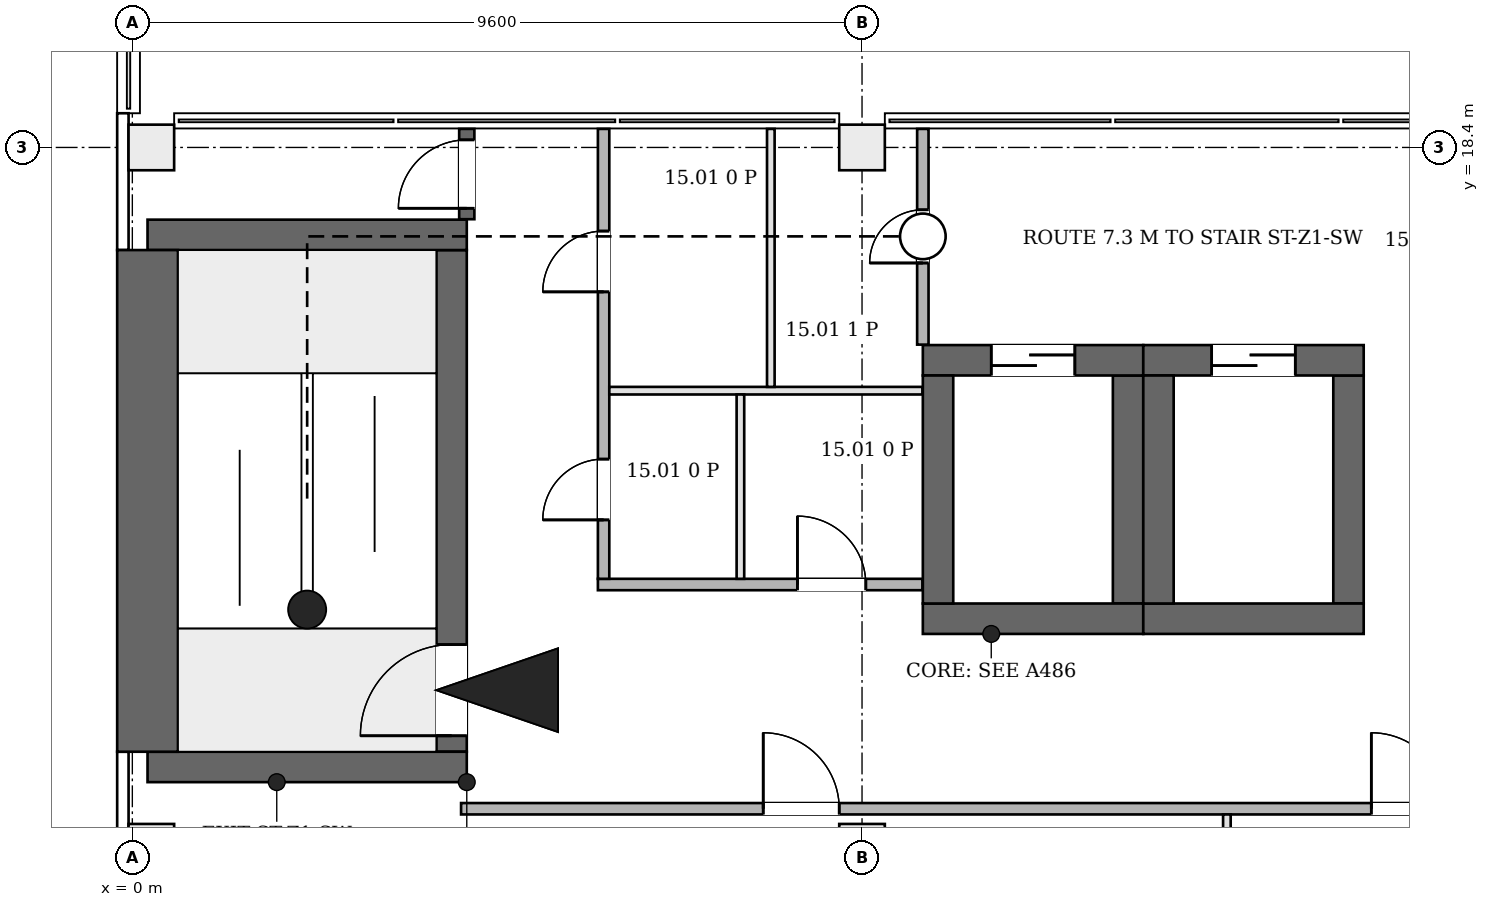
"""IFC4 building model, lengths in metres.
Left out: names, types, materials, properties, quantities, classifications, styles, units other than length and angle.
Written with IfcOpenShell. Run it as: python <this file> out.ifc"""

import sys

from ifc_helpers import new_model, si_unit, direction, frame, frame_2d, origin, origin_2d, place, context, subcontext, project, spatial, rectangle, extrude, element, fill, save


model = new_model("IFC4")
c1 = context("Model", 3, precision=1e-05, world=origin(), true_north=direction((0.0, 1.0)))
c2 = subcontext(c1, "Body", "Model", "MODEL_VIEW")
j1 = project(units=[si_unit("LENGTHUNIT", "METRE"), si_unit("PLANEANGLEUNIT", "RADIAN")], contexts=[c1])
p1 = place(None, origin())
s1 = spatial("IfcSite", under=j1, at=p1, CompositionType="ELEMENT")
p2 = place(p1, origin())
s2 = spatial("IfcBuilding", under=s1, at=p2, CompositionType="ELEMENT")
p3 = place(p2, frame((0.0, 0.0, 73.9)))
s3 = spatial("IfcBuildingStorey", under=s2, at=p3, CompositionType="ELEMENT", Elevation=73.9)
for number, where, z_axis, x_axis in (
    (1, (0.2, 10.25, 0.0), (0.0, 0.0, 1.0), (1.0, 0.0, 0.0)),
    (2, (0.2, 17.25, 0.0), (0.0, 0.0, 1.0), (1.0, 0.0, 0.0)),
):
    element("IfcWall", number, at=place(p3, frame(where, z_axis=z_axis, x_axis=x_axis)), inside=s3, PredefinedType="SHEAR", context=c2, shape_type="SweptSolid", body=[
        extrude(rectangle(XDim=4.2, YDim=0.4, at=frame_2d((2.1, 0.0))), origin(), (0.0, 0.0, 1.0), 4.2),
    ])
p4 = place(p3, frame((0.2, 10.45, 0.0), z_axis=(0.0, 0.0, 1.0), x_axis=(0.0, 1.0, 0.0)))
e3 = element("IfcWall", 3, at=p4, inside=s3, PredefinedType="SHEAR", context=c2, shape_type="SweptSolid", body=[
    extrude(rectangle(XDim=6.6, YDim=0.8, at=frame_2d((3.3, 0.0))), origin(), (0.0, 0.0, 1.0), 4.2),
])
p5 = place(p3, frame((4.2, 10.45, 0.0), z_axis=(0.0, 0.0, 1.0), x_axis=(0.0, 1.0, 0.0)))
e4 = element("IfcWall", 4, at=p5, inside=s3, PredefinedType="SHEAR", context=c2, shape_type="SweptSolid", body=[
    extrude(rectangle(XDim=6.6, YDim=0.4, at=frame_2d((3.3, 0.0))), origin(), (0.0, 0.0, 1.0), 4.2),
])
p6 = place(p5, frame((0.21, 0.0, 0.0)))
e5 = element("IfcOpeningElement", 5, at=p6, cuts=e4, PredefinedType="OPENING", context=c2, shape_type="SweptSolid", body=[
    extrude(rectangle(XDim=1.2, YDim=2.1, at=frame_2d((0.6, 1.05))), frame((0.0, 0.21, 0.0), z_axis=(0.0, -1.0, 0.0), x_axis=(1.0, 0.0, 0.0)), (0.0, 0.0, 1.0), 0.42),
])
p7 = place(p3, frame((10.4, 12.2, 0.0), z_axis=(0.0, 0.0, 1.0), x_axis=(1.0, 0.0, 0.0)))
e6 = element("IfcWall", 6, at=p7, inside=s3, PredefinedType="SHEAR", context=c2, shape_type="SweptSolid", body=[
    extrude(rectangle(XDim=2.9, YDim=0.4, at=frame_2d((1.45, 0.0))), origin(), (0.0, 0.0, 1.0), 4.2),
])
p8 = place(p3, frame((10.4, 15.6, 0.0), z_axis=(0.0, 0.0, 1.0), x_axis=(1.0, 0.0, 0.0)))
e7 = element("IfcWall", 7, at=p8, inside=s3, PredefinedType="SHEAR", context=c2, shape_type="SweptSolid", body=[
    extrude(rectangle(XDim=2.9, YDim=0.4, at=frame_2d((1.45, 0.0))), origin(), (0.0, 0.0, 1.0), 4.2),
])
p9 = place(p8, frame((0.9, 0.0, 0.0)))
e8 = element("IfcOpeningElement", 8, at=p9, cuts=e7, PredefinedType="OPENING", context=c2, shape_type="SweptSolid", body=[
    extrude(rectangle(XDim=1.1, YDim=2.1, at=frame_2d((0.55, 1.05))), frame((0.0, 0.21, 0.0), z_axis=(0.0, -1.0, 0.0), x_axis=(1.0, 0.0, 0.0)), (0.0, 0.0, 1.0), 0.42),
])
for number, where, z_axis, x_axis in (
    (9, (10.6, 12.4, 0.0), (0.0, 0.0, 1.0), (0.0, 1.0, 0.0)),
    (10, (13.1, 12.4, 0.0), (0.0, 0.0, 1.0), (0.0, 1.0, 0.0)),
):
    element("IfcWall", number, at=place(p3, frame(where, z_axis=z_axis, x_axis=x_axis)), inside=s3, PredefinedType="SHEAR", context=c2, shape_type="SweptSolid", body=[
        extrude(rectangle(XDim=3.0, YDim=0.4, at=frame_2d((1.5, 0.0))), origin(), (0.0, 0.0, 1.0), 4.2),
    ])
p10 = place(p3, frame((13.3, 12.2, 0.0), z_axis=(0.0, 0.0, 1.0), x_axis=(1.0, 0.0, 0.0)))
e11 = element("IfcWall", 11, at=p10, inside=s3, PredefinedType="SHEAR", context=c2, shape_type="SweptSolid", body=[
    extrude(rectangle(XDim=2.9, YDim=0.4, at=frame_2d((1.45, 0.0))), origin(), (0.0, 0.0, 1.0), 4.2),
])
p11 = place(p3, frame((13.3, 15.6, 0.0), z_axis=(0.0, 0.0, 1.0), x_axis=(1.0, 0.0, 0.0)))
e12 = element("IfcWall", 12, at=p11, inside=s3, PredefinedType="SHEAR", context=c2, shape_type="SweptSolid", body=[
    extrude(rectangle(XDim=2.9, YDim=0.4, at=frame_2d((1.45, 0.0))), origin(), (0.0, 0.0, 1.0), 4.2),
])
p12 = place(p11, frame((0.9, 0.0, 0.0)))
e13 = element("IfcOpeningElement", 13, at=p12, cuts=e12, PredefinedType="OPENING", context=c2, shape_type="SweptSolid", body=[
    extrude(rectangle(XDim=1.1, YDim=2.1, at=frame_2d((0.55, 1.05))), frame((0.0, 0.21, 0.0), z_axis=(0.0, -1.0, 0.0), x_axis=(1.0, 0.0, 0.0)), (0.0, 0.0, 1.0), 0.42),
])
for number, where, z_axis, x_axis in (
    (14, (13.5, 12.4, 0.0), (0.0, 0.0, 1.0), (0.0, 1.0, 0.0)),
    (15, (16.0, 12.4, 0.0), (0.0, 0.0, 1.0), (0.0, 1.0, 0.0)),
):
    element("IfcWall", number, at=place(p3, frame(where, z_axis=z_axis, x_axis=x_axis)), inside=s3, PredefinedType="SHEAR", context=c2, shape_type="SweptSolid", body=[
        extrude(rectangle(XDim=3.0, YDim=0.4, at=frame_2d((1.5, 0.0))), origin(), (0.0, 0.0, 1.0), 4.2),
    ])
for number, where, z_axis, x_axis in (
    (16, (0.25, 9.2, 0.0), (0.0, 0.0, 1.0), (1.0, 0.0, 0.0)),
    (17, (9.6, 9.2, 0.0), (0.0, 0.0, 1.0), (1.0, 0.0, 0.0)),
    (18, (0.25, 18.4, 0.0), (0.0, 0.0, 1.0), (1.0, 0.0, 0.0)),
    (19, (9.6, 18.4, 0.0), (0.0, 0.0, 1.0), (1.0, 0.0, 0.0)),
):
    element("IfcColumn", number, at=place(p3, frame(where, z_axis=z_axis, x_axis=x_axis)), inside=s3, PredefinedType="COLUMN", context=c2, shape_type="SweptSolid", body=[
        extrude(rectangle(XDim=0.6, YDim=0.6, at=origin_2d()), origin(), (0.0, 0.0, 1.0), 4.2),
    ])
p13 = place(p3, frame((-0.125, 10.45, 0.0), z_axis=(0.0, 0.0, 1.0), x_axis=(0.0, -1.0, 0.0)))
e20 = element("IfcWall", 20, at=p13, inside=s3, PredefinedType="ELEMENTEDWALL", context=c2, shape_type="SweptSolid", body=[
    extrude(rectangle(XDim=10.65, YDim=0.15, at=frame_2d((5.325, 0.0))), origin(), (0.0, 0.0, 1.0), 3.9),
])
p14 = place(p13, frame((8.325, 0.0, 0.9)))
e21 = element("IfcOpeningElement", 21, at=p14, cuts=e20, PredefinedType="OPENING", context=c2, shape_type="SweptSolid", body=[
    extrude(rectangle(XDim=1.2, YDim=2.6, at=frame_2d((0.6, 1.3))), frame((0.0, 0.085, 0.0), z_axis=(0.0, -1.0, 0.0), x_axis=(1.0, 0.0, 0.0)), (0.0, 0.0, 1.0), 0.17),
])
p15 = place(p13, frame((5.925, 0.0, 0.9)))
e22 = element("IfcOpeningElement", 22, at=p15, cuts=e20, PredefinedType="OPENING", context=c2, shape_type="SweptSolid", body=[
    extrude(rectangle(XDim=1.2, YDim=2.6, at=frame_2d((0.6, 1.3))), frame((0.0, 0.085, 0.0), z_axis=(0.0, -1.0, 0.0), x_axis=(1.0, 0.0, 0.0)), (0.0, 0.0, 1.0), 0.17),
])
p16 = place(p13, frame((3.525, 0.0, 0.9)))
e23 = element("IfcOpeningElement", 23, at=p16, cuts=e20, PredefinedType="OPENING", context=c2, shape_type="SweptSolid", body=[
    extrude(rectangle(XDim=1.2, YDim=2.6, at=frame_2d((0.6, 1.3))), frame((0.0, 0.085, 0.0), z_axis=(0.0, -1.0, 0.0), x_axis=(1.0, 0.0, 0.0)), (0.0, 0.0, 1.0), 0.17),
])
p17 = place(p13, frame((1.125, 0.0, 0.9)))
e24 = element("IfcOpeningElement", 24, at=p17, cuts=e20, PredefinedType="OPENING", context=c2, shape_type="SweptSolid", body=[
    extrude(rectangle(XDim=1.2, YDim=2.6, at=frame_2d((0.6, 1.3))), frame((0.0, 0.085, 0.0), z_axis=(0.0, -1.0, 0.0), x_axis=(1.0, 0.0, 0.0)), (0.0, 0.0, 1.0), 0.17),
])
p18 = place(p3, frame((-0.125, 18.85, 0.0), z_axis=(0.0, 0.0, 1.0), x_axis=(0.0, -1.0, 0.0)))
e25 = element("IfcWall", 25, at=p18, inside=s3, PredefinedType="ELEMENTEDWALL", context=c2, shape_type="SweptSolid", body=[
    extrude(rectangle(XDim=1.8, YDim=0.15, at=frame_2d((0.9, 0.0))), origin(), (0.0, 0.0, 1.0), 3.9),
])
p19 = place(p3, frame((4.4, 17.456, 0.0), z_axis=(0.0, 0.0, 1.0), x_axis=(0.0, 1.0, 0.0)))
e26 = element("IfcWall", 26, at=p19, inside=s3, PredefinedType="PARTITIONING", context=c2, shape_type="SweptSolid", body=[
    extrude(rectangle(XDim=1.188, YDim=0.2, at=frame_2d((0.594, 0.0))), origin(), (0.0, 0.0, 1.0), 3.9),
])
p20 = place(p19, frame((0.144, 0.0, 0.0)))
e27 = element("IfcOpeningElement", 27, at=p20, cuts=e26, PredefinedType="OPENING", context=c2, shape_type="SweptSolid", body=[
    extrude(rectangle(XDim=0.9, YDim=2.1, at=frame_2d((0.45, 1.05))), frame((0.0, 0.11, 0.0), z_axis=(0.0, -1.0, 0.0), x_axis=(1.0, 0.0, 0.0)), (0.0, 0.0, 1.0), 0.22),
])
p21 = place(p3, frame((4.325, 9.7, 0.0), z_axis=(0.0, 0.0, 1.0), x_axis=(1.0, 0.0, 0.0)))
e28 = element("IfcWall", 28, at=p21, inside=s3, PredefinedType="PARTITIONING", context=c2, shape_type="SweptSolid", body=[
    extrude(rectangle(XDim=34.369, YDim=0.15, at=frame_2d((17.185, 0.0))), origin(), (0.0, 0.0, 1.0), 3.9),
])
p22 = place(p21, frame((3.975, 0.0, 0.0)))
e29 = element("IfcOpeningElement", 29, at=p22, cuts=e28, PredefinedType="OPENING", context=c2, shape_type="SweptSolid", body=[
    extrude(rectangle(XDim=1.0, YDim=2.1, at=frame_2d((0.5, 1.05))), frame((0.0, 0.085, 0.0), z_axis=(0.0, -1.0, 0.0), x_axis=(1.0, 0.0, 0.0)), (0.0, 0.0, 1.0), 0.17),
])
p23 = place(p21, frame((11.975, 0.0, 0.0)))
e30 = element("IfcOpeningElement", 30, at=p23, cuts=e28, PredefinedType="OPENING", context=c2, shape_type="SweptSolid", body=[
    extrude(rectangle(XDim=1.0, YDim=2.1, at=frame_2d((0.5, 1.05))), frame((0.0, 0.085, 0.0), z_axis=(0.0, -1.0, 0.0), x_axis=(1.0, 0.0, 0.0)), (0.0, 0.0, 1.0), 0.17),
])
p24 = place(p21, frame((19.175, 0.0, 0.0)))
e31 = element("IfcOpeningElement", 31, at=p24, cuts=e28, PredefinedType="OPENING", context=c2, shape_type="SweptSolid", body=[
    extrude(rectangle(XDim=1.0, YDim=2.1, at=frame_2d((0.5, 1.05))), frame((0.0, 0.085, 0.0), z_axis=(0.0, -1.0, 0.0), x_axis=(1.0, 0.0, 0.0)), (0.0, 0.0, 1.0), 0.17),
])
p25 = place(p21, frame((28.925, 0.0, 0.0)))
e32 = element("IfcOpeningElement", 32, at=p25, cuts=e28, PredefinedType="OPENING", context=c2, shape_type="SweptSolid", body=[
    extrude(rectangle(XDim=1.0, YDim=2.1, at=frame_2d((0.5, 1.05))), frame((0.0, 0.085, 0.0), z_axis=(0.0, -1.0, 0.0), x_axis=(1.0, 0.0, 0.0)), (0.0, 0.0, 1.0), 0.17),
])
p26 = place(p3, frame((6.125, 12.65, 0.0), z_axis=(0.0, 0.0, 1.0), x_axis=(1.0, 0.0, 0.0)))
e33 = element("IfcWall", 33, at=p26, inside=s3, PredefinedType="PARTITIONING", context=c2, shape_type="SweptSolid", body=[
    extrude(rectangle(XDim=4.269, YDim=0.15, at=frame_2d((2.135, 0.0))), origin(), (0.0, 0.0, 1.0), 3.9),
])
p27 = place(p26, frame((2.625, 0.0, 0.0)))
e34 = element("IfcOpeningElement", 34, at=p27, cuts=e33, PredefinedType="OPENING", context=c2, shape_type="SweptSolid", body=[
    extrude(rectangle(XDim=0.9, YDim=2.1, at=frame_2d((0.45, 1.05))), frame((0.0, 0.085, 0.0), z_axis=(0.0, -1.0, 0.0), x_axis=(1.0, 0.0, 0.0)), (0.0, 0.0, 1.0), 0.17),
])
p28 = place(p3, frame((6.2, 12.725, 0.0), z_axis=(0.0, 0.0, 1.0), x_axis=(0.0, 1.0, 0.0)))
e35 = element("IfcWall", 35, at=p28, inside=s3, PredefinedType="PARTITIONING", context=c2, shape_type="SweptSolid", body=[
    extrude(rectangle(XDim=5.919, YDim=0.15, at=frame_2d((2.959, 0.0))), origin(), (0.0, 0.0, 1.0), 3.9),
])
p29 = place(p28, frame((0.775, 0.0, 0.0)))
e36 = element("IfcOpeningElement", 36, at=p29, cuts=e35, PredefinedType="OPENING", context=c2, shape_type="SweptSolid", body=[
    extrude(rectangle(XDim=0.8, YDim=2.1, at=frame_2d((0.4, 1.05))), frame((0.0, 0.085, 0.0), z_axis=(0.0, -1.0, 0.0), x_axis=(1.0, 0.0, 0.0)), (0.0, 0.0, 1.0), 0.17),
])
p30 = place(p28, frame((3.775, 0.0, 0.0)))
e37 = element("IfcOpeningElement", 37, at=p30, cuts=e35, PredefinedType="OPENING", context=c2, shape_type="SweptSolid", body=[
    extrude(rectangle(XDim=0.8, YDim=2.1, at=frame_2d((0.4, 1.05))), frame((0.0, 0.085, 0.0), z_axis=(0.0, -1.0, 0.0), x_axis=(1.0, 0.0, 0.0)), (0.0, 0.0, 1.0), 0.17),
])
p31 = place(p3, frame((6.275, 15.2, 0.0), z_axis=(0.0, 0.0, 1.0), x_axis=(1.0, 0.0, 0.0)))
e38 = element("IfcWall", 38, at=p31, inside=s3, PredefinedType="PARTITIONING", context=c2, shape_type="SweptSolid", body=[
    extrude(rectangle(XDim=4.119, YDim=0.1, at=frame_2d((2.06, 0.0))), origin(), (0.0, 0.0, 1.0), 3.9),
])
p32 = place(p3, frame((8.0, 12.725, 0.0), z_axis=(0.0, 0.0, 1.0), x_axis=(0.0, 1.0, 0.0)))
e39 = element("IfcWall", 39, at=p32, inside=s3, PredefinedType="PARTITIONING", context=c2, shape_type="SweptSolid", body=[
    extrude(rectangle(XDim=2.425, YDim=0.1, at=frame_2d((1.212, 0.0))), origin(), (0.0, 0.0, 1.0), 3.9),
])
p33 = place(p3, frame((8.4, 15.25, 0.0), z_axis=(0.0, 0.0, 1.0), x_axis=(0.0, 1.0, 0.0)))
e40 = element("IfcWall", 40, at=p33, inside=s3, PredefinedType="PARTITIONING", context=c2, shape_type="SweptSolid", body=[
    extrude(rectangle(XDim=3.394, YDim=0.1, at=frame_2d((1.697, 0.0))), origin(), (0.0, 0.0, 1.0), 3.9),
])
p34 = place(p3, frame((10.4, 15.806, 0.0), z_axis=(0.0, 0.0, 1.0), x_axis=(0.0, 1.0, 0.0)))
e41 = element("IfcWall", 41, at=p34, inside=s3, PredefinedType="PARTITIONING", context=c2, shape_type="SweptSolid", body=[
    extrude(rectangle(XDim=2.838, YDim=0.15, at=frame_2d((1.419, 0.0))), origin(), (0.0, 0.0, 1.0), 3.9),
])
p35 = place(p34, frame((1.074, 0.0, 0.0)))
e42 = element("IfcOpeningElement", 42, at=p35, cuts=e41, PredefinedType="OPENING", context=c2, shape_type="SweptSolid", body=[
    extrude(rectangle(XDim=0.7, YDim=2.1, at=frame_2d((0.35, 1.05))), frame((0.0, 0.085, 0.0), z_axis=(0.0, -1.0, 0.0), x_axis=(1.0, 0.0, 0.0)), (0.0, 0.0, 1.0), 0.17),
])
p36 = place(p3, frame((14.4, 0.006, 0.0), z_axis=(0.0, 0.0, 1.0), x_axis=(0.0, 1.0, 0.0)))
e43 = element("IfcWall", 43, at=p36, inside=s3, PredefinedType="PARTITIONING", context=c2, shape_type="SweptSolid", body=[
    extrude(rectangle(XDim=9.619, YDim=0.1, at=frame_2d((4.81, 0.0))), origin(), (0.0, 0.0, 1.0), 3.9),
])
p37 = place(p6, origin())
e44 = element("IfcDoor", 44, at=p37, inside=s3, OperationType="SINGLE_SWING_RIGHT", PredefinedType="DOOR", context=c2, shape_type="SweptSolid", body=[
    extrude(rectangle(XDim=1.2, YDim=2.1, at=frame_2d((0.6, 1.05))), frame((0.0, 0.025, 0.0), z_axis=(0.0, -1.0, 0.0), x_axis=(1.0, 0.0, 0.0)), (0.0, 0.0, 1.0), 0.05),
])
fill(e5, e44)
p38 = place(p9, origin())
e45 = element("IfcDoor", 45, at=p38, inside=s3, OperationType="DOUBLE_DOOR_SLIDING", PredefinedType="DOOR", context=c2, shape_type="SweptSolid", body=[
    extrude(rectangle(XDim=1.1, YDim=2.1, at=frame_2d((0.55, 1.05))), frame((0.0, 0.025, 0.0), z_axis=(0.0, -1.0, 0.0), x_axis=(1.0, 0.0, 0.0)), (0.0, 0.0, 1.0), 0.05),
])
fill(e8, e45)
p39 = place(p12, origin())
e46 = element("IfcDoor", 46, at=p39, inside=s3, OperationType="DOUBLE_DOOR_SLIDING", PredefinedType="DOOR", context=c2, shape_type="SweptSolid", body=[
    extrude(rectangle(XDim=1.1, YDim=2.1, at=frame_2d((0.55, 1.05))), frame((0.0, 0.025, 0.0), z_axis=(0.0, -1.0, 0.0), x_axis=(1.0, 0.0, 0.0)), (0.0, 0.0, 1.0), 0.05),
])
fill(e13, e46)
p40 = place(p20, origin())
e47 = element("IfcDoor", 47, at=p40, inside=s3, OperationType="SINGLE_SWING_LEFT", PredefinedType="DOOR", context=c2, shape_type="SweptSolid", body=[
    extrude(rectangle(XDim=0.9, YDim=2.1, at=frame_2d((0.45, 1.05))), frame((0.0, 0.025, 0.0), z_axis=(0.0, -1.0, 0.0), x_axis=(1.0, 0.0, 0.0)), (0.0, 0.0, 1.0), 0.05),
])
fill(e27, e47)
p41 = place(p29, origin())
e48 = element("IfcDoor", 48, at=p41, inside=s3, OperationType="SINGLE_SWING_LEFT", PredefinedType="DOOR", context=c2, shape_type="SweptSolid", body=[
    extrude(rectangle(XDim=0.8, YDim=2.1, at=frame_2d((0.4, 1.05))), frame((0.0, 0.025, 0.0), z_axis=(0.0, -1.0, 0.0), x_axis=(1.0, 0.0, 0.0)), (0.0, 0.0, 1.0), 0.05),
])
fill(e36, e48)
p42 = place(p27, origin())
e49 = element("IfcDoor", 49, at=p42, inside=s3, OperationType="SINGLE_SWING_RIGHT", PredefinedType="DOOR", context=c2, shape_type="SweptSolid", body=[
    extrude(rectangle(XDim=0.9, YDim=2.1, at=frame_2d((0.45, 1.05))), frame((0.0, 0.025, 0.0), z_axis=(0.0, -1.0, 0.0), x_axis=(1.0, 0.0, 0.0)), (0.0, 0.0, 1.0), 0.05),
])
fill(e34, e49)
p43 = place(p30, origin())
e50 = element("IfcDoor", 50, at=p43, inside=s3, OperationType="SINGLE_SWING_LEFT", PredefinedType="DOOR", context=c2, shape_type="SweptSolid", body=[
    extrude(rectangle(XDim=0.8, YDim=2.1, at=frame_2d((0.4, 1.05))), frame((0.0, 0.025, 0.0), z_axis=(0.0, -1.0, 0.0), x_axis=(1.0, 0.0, 0.0)), (0.0, 0.0, 1.0), 0.05),
])
fill(e37, e50)
p44 = place(p35, origin())
e51 = element("IfcDoor", 51, at=p44, inside=s3, OperationType="SINGLE_SWING_LEFT", PredefinedType="DOOR", context=c2, shape_type="SweptSolid", body=[
    extrude(rectangle(XDim=0.7, YDim=2.1, at=frame_2d((0.35, 1.05))), frame((0.0, 0.025, 0.0), z_axis=(0.0, -1.0, 0.0), x_axis=(1.0, 0.0, 0.0)), (0.0, 0.0, 1.0), 0.05),
])
fill(e42, e51)
p45 = place(p22, origin())
e52 = element("IfcDoor", 52, at=p45, inside=s3, OperationType="SINGLE_SWING_RIGHT", PredefinedType="DOOR", context=c2, shape_type="SweptSolid", body=[
    extrude(rectangle(XDim=1.0, YDim=2.1, at=frame_2d((0.5, 1.05))), frame((0.0, 0.025, 0.0), z_axis=(0.0, -1.0, 0.0), x_axis=(1.0, 0.0, 0.0)), (0.0, 0.0, 1.0), 0.05),
])
fill(e29, e52)
p46 = place(p23, origin())
e53 = element("IfcDoor", 53, at=p46, inside=s3, OperationType="SINGLE_SWING_RIGHT", PredefinedType="DOOR", context=c2, shape_type="SweptSolid", body=[
    extrude(rectangle(XDim=1.0, YDim=2.1, at=frame_2d((0.5, 1.05))), frame((0.0, 0.025, 0.0), z_axis=(0.0, -1.0, 0.0), x_axis=(1.0, 0.0, 0.0)), (0.0, 0.0, 1.0), 0.05),
])
fill(e30, e53)
save(model, sys.argv[1])
